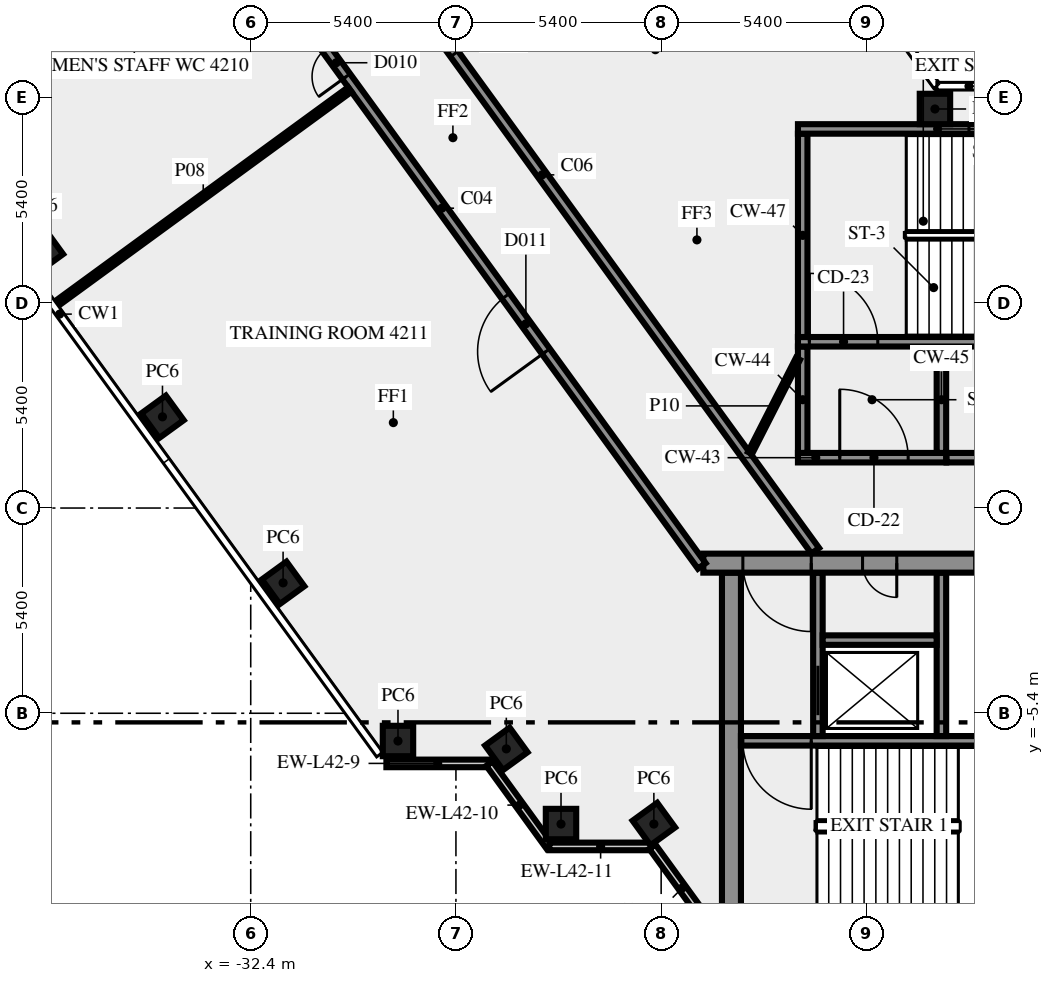
"""IFC4 building model, lengths in metres.
Left out: names, types, materials, properties, quantities, classifications, styles, units other than length and angle.
Written with IfcOpenShell. Run it as: python <this file> out.ifc"""

import sys

from ifc_helpers import new_model, si_unit, direction, frame, frame_2d, origin, origin_2d, place, context, subcontext, project, spatial, rectangle, extrude, element, fill, save


model = new_model("IFC4")
c1 = context("Model", 3, precision=1e-05, world=origin(), true_north=direction((0.0, 1.0)))
c2 = subcontext(c1, "Body", "Model", "MODEL_VIEW")
j1 = project(units=[si_unit("LENGTHUNIT", "METRE"), si_unit("PLANEANGLEUNIT", "RADIAN")], contexts=[c1])
p1 = place(None, origin())
s1 = spatial("IfcSite", under=j1, at=p1, CompositionType="ELEMENT")
p2 = place(p1, origin())
s2 = spatial("IfcBuilding", under=s1, at=p2, CompositionType="ELEMENT")
p3 = place(p2, frame((0.0, 0.0, 180.0)))
s3 = spatial("IfcBuildingStorey", under=s2, at=p3, CompositionType="ELEMENT", Elevation=180.0)
for number, where, z_axis, x_axis in (
    (1, (-37.896, 6.769, 0.0), (0.0, 0.0, 1.0), (0.588, -0.809, 0.0)),
    (2, (-34.722, 2.4, 0.0), (0.0, 0.0, 1.0), (0.588, -0.809, 0.0)),
    (3, (-31.548, -1.969, 0.0), (0.0, 0.0, 1.0), (0.588, -0.809, 0.0)),
    (4, (-28.525, -6.13, 0.0), (0.0, 0.0, 1.0), (1.0, 0.0, 0.0)),
    (5, (-25.674, -6.337, 0.0), (0.0, 0.0, 1.0), (0.588, -0.809, 0.0)),
    (6, (-24.235, -8.315, 0.0), (0.0, 0.0, 1.0), (1.0, 0.0, 0.0)),
    (7, (-21.792, -8.315, 0.0), (0.0, 0.0, 1.0), (0.588, -0.809, 0.0)),
    (8, (-14.395, 10.5, 0.0), (0.0, 0.0, 1.0), (-1.0, 0.0, 0.0)),
):
    element("IfcColumn", number, at=place(p3, frame(where, z_axis=z_axis, x_axis=x_axis)), inside=s3, PredefinedType="COLUMN", context=c2, shape_type="SweptSolid", body=[
        extrude(rectangle(XDim=0.8, YDim=0.8, at=origin_2d()), origin(), (0.0, 0.0, 1.0), 3.65),
    ])
p4 = place(p3, frame((-28.83, -6.719, 0.0), z_axis=(0.0, 0.0, 1.0), x_axis=(1.0, 0.0, 0.0)))
e9 = element("IfcWall", 9, at=p4, inside=s3, PredefinedType="SOLIDWALL", context=c2, shape_type="SweptSolid", body=[
    extrude(rectangle(XDim=2.7, YDim=0.2, at=frame_2d((1.35, 0.0))), origin(), (0.0, 0.0, 1.0), 3.65),
])
p5 = place(p3, frame((-26.12, -6.724, 0.0), z_axis=(0.0, 0.0, 1.0), x_axis=(0.587720002413, -0.809064397168, 0.0)))
e10 = element("IfcWall", 10, at=p5, inside=s3, PredefinedType="SOLIDWALL", context=c2, shape_type="SweptSolid", body=[
    extrude(rectangle(XDim=2.7, YDim=0.2, at=frame_2d((1.35, 0.0))), origin(), (0.0, 0.0, 1.0), 3.65),
])
p6 = place(p3, frame((-24.543, -8.904, 0.0), z_axis=(0.0, 0.0, 1.0), x_axis=(1.0, 0.0, 0.0)))
e11 = element("IfcWall", 11, at=p6, inside=s3, PredefinedType="SOLIDWALL", context=c2, shape_type="SweptSolid", body=[
    extrude(rectangle(XDim=2.7, YDim=0.2, at=frame_2d((1.35, 0.0))), origin(), (0.0, 0.0, 1.0), 3.65),
])
p7 = place(p3, frame((-21.833, -8.909, 0.0), z_axis=(0.0, 0.0, 1.0), x_axis=(0.587766567315, -0.809030569476, 0.0)))
e12 = element("IfcWall", 12, at=p7, inside=s3, PredefinedType="SOLIDWALL", context=c2, shape_type="SweptSolid", body=[
    extrude(rectangle(XDim=2.688, YDim=0.2, at=frame_2d((1.344, 0.0))), origin(), (0.0, 0.0, 1.0), 3.65),
])
p8 = place(p3, frame((-19.75, -10.5, 0.0), z_axis=(0.0, 0.0, 1.0), x_axis=(0.0, 1.0, 0.0)))
e13 = element("IfcWall", 13, at=p8, inside=s3, PredefinedType="SHEAR", context=c2, shape_type="SweptSolid", body=[
    extrude(rectangle(XDim=8.8, YDim=0.5, at=frame_2d((4.4, 0.0))), origin(), (0.0, 0.0, 1.0), 3.65),
])
p9 = place(p3, frame((-11.45, -6.125, 0.0), z_axis=(0.0, 0.0, 1.0), x_axis=(-1.0, 0.0, 0.0)))
e14 = element("IfcWall", 14, at=p9, inside=s3, PredefinedType="SHEAR", context=c2, shape_type="SweptSolid", body=[
    extrude(rectangle(XDim=8.05, YDim=0.25, at=frame_2d((4.025, 0.0))), origin(), (0.0, 0.0, 1.0), 3.65),
])
p10 = place(p9, frame((6.2, 0.0, 0.0)))
e15 = element("IfcOpeningElement", 15, at=p10, cuts=e14, PredefinedType="OPENING", context=c2, shape_type="SweptSolid", body=[
    extrude(rectangle(XDim=1.8, YDim=2.1, at=frame_2d((0.9, 1.05))), frame((0.0, 0.135, 0.0), z_axis=(0.0, -1.0, 0.0), x_axis=(1.0, 0.0, 0.0)), (0.0, 0.0, 1.0), 0.27),
])
p11 = place(p3, frame((-17.475, -6.0, 0.0), z_axis=(0.0, 0.0, 1.0), x_axis=(0.0, 1.0, 0.0)))
e16 = element("IfcWall", 16, at=p11, inside=s3, PredefinedType="SHEAR", context=c2, shape_type="SweptSolid", body=[
    extrude(rectangle(XDim=4.3, YDim=0.25, at=frame_2d((2.15, 0.0))), origin(), (0.0, 0.0, 1.0), 3.65),
])
p12 = place(p11, frame((0.55, 0.0, 0.0)))
e17 = element("IfcOpeningElement", 17, at=p12, cuts=e16, PredefinedType="OPENING", context=c2, shape_type="SweptSolid", body=[
    extrude(rectangle(XDim=1.3, YDim=2.1, at=frame_2d((0.65, 1.05))), frame((0.0, 0.135, 0.0), z_axis=(0.0, -1.0, 0.0), x_axis=(1.0, 0.0, 0.0)), (0.0, 0.0, 1.0), 0.27),
])
p13 = place(p3, frame((-14.225, -6.0, 0.0), z_axis=(0.0, 0.0, 1.0), x_axis=(0.0, 1.0, 0.0)))
e18 = element("IfcWall", 18, at=p13, inside=s3, PredefinedType="SHEAR", context=c2, shape_type="SweptSolid", body=[
    extrude(rectangle(XDim=4.3, YDim=0.25, at=frame_2d((2.15, 0.0))), origin(), (0.0, 0.0, 1.0), 3.65),
])
p14 = place(p3, frame((-17.35, -3.475, 0.0), z_axis=(0.0, 0.0, 1.0), x_axis=(1.0, 0.0, 0.0)))
e19 = element("IfcWall", 19, at=p14, inside=s3, PredefinedType="SHEAR", context=c2, shape_type="SweptSolid", body=[
    extrude(rectangle(XDim=3.0, YDim=0.25, at=frame_2d((1.5, 0.0))), origin(), (0.0, 0.0, 1.0), 3.65),
])
p15 = place(p3, frame((20.49, -1.45, 0.0), z_axis=(0.0, 0.0, 1.0), x_axis=(-1.0, 0.0, 0.0)))
e20 = element("IfcWall", 20, at=p15, inside=s3, PredefinedType="SHEAR", context=c2, shape_type="SweptSolid", body=[
    extrude(rectangle(XDim=40.98, YDim=0.5, at=frame_2d((20.49, 0.0))), origin(), (0.0, 0.0, 1.0), 3.65),
])
p16 = place(p15, frame((38.14, 0.0, 0.0)))
e21 = element("IfcOpeningElement", 21, at=p16, cuts=e20, PredefinedType="OPENING", context=c2, shape_type="SweptSolid", body=[
    extrude(rectangle(XDim=1.8, YDim=2.1, at=frame_2d((0.9, 1.05))), frame((0.0, 0.26, 0.0), z_axis=(0.0, -1.0, 0.0), x_axis=(1.0, 0.0, 0.0)), (0.0, 0.0, 1.0), 0.52),
])
p17 = place(p15, frame((35.89, 0.0, 0.0)))
e22 = element("IfcOpeningElement", 22, at=p17, cuts=e20, PredefinedType="OPENING", context=c2, shape_type="SweptSolid", body=[
    extrude(rectangle(XDim=0.9, YDim=2.1, at=frame_2d((0.45, 1.05))), frame((0.0, 0.26, 0.0), z_axis=(0.0, -1.0, 0.0), x_axis=(1.0, 0.0, 0.0)), (0.0, 0.0, 1.0), 0.52),
])
p18 = place(p15, frame((32.94, 0.0, 0.0)))
e23 = element("IfcOpeningElement", 23, at=p18, cuts=e20, PredefinedType="OPENING", context=c2, shape_type="SweptSolid", body=[
    extrude(rectangle(XDim=0.9, YDim=2.1, at=frame_2d((0.45, 1.05))), frame((0.0, 0.26, 0.0), z_axis=(0.0, -1.0, 0.0), x_axis=(1.0, 0.0, 0.0)), (0.0, 0.0, 1.0), 0.52),
])
p19 = place(p15, frame((30.802, 0.0, 0.0)))
e24 = element("IfcOpeningElement", 24, at=p19, cuts=e20, PredefinedType="OPENING", context=c2, shape_type="SweptSolid", body=[
    extrude(rectangle(XDim=0.9, YDim=2.1, at=frame_2d((0.45, 1.05))), frame((0.0, 0.26, 0.0), z_axis=(0.0, -1.0, 0.0), x_axis=(1.0, 0.0, 0.0)), (0.0, 0.0, 1.0), 0.52),
])
p20 = place(p15, frame((29.24, 0.0, 0.0)))
e25 = element("IfcOpeningElement", 25, at=p20, cuts=e20, PredefinedType="OPENING", context=c2, shape_type="SweptSolid", body=[
    extrude(rectangle(XDim=0.9, YDim=2.1, at=frame_2d((0.45, 1.05))), frame((0.0, 0.26, 0.0), z_axis=(0.0, -1.0, 0.0), x_axis=(1.0, 0.0, 0.0)), (0.0, 0.0, 1.0), 0.52),
])
p21 = place(p15, frame((27.39, 0.0, 0.0)))
e26 = element("IfcOpeningElement", 26, at=p21, cuts=e20, PredefinedType="OPENING", context=c2, shape_type="SweptSolid", body=[
    extrude(rectangle(XDim=0.9, YDim=2.1, at=frame_2d((0.45, 1.05))), frame((0.0, 0.26, 0.0), z_axis=(0.0, -1.0, 0.0), x_axis=(1.0, 0.0, 0.0)), (0.0, 0.0, 1.0), 0.52),
])
p22 = place(p15, frame((25.228, 0.0, 0.0)))
e27 = element("IfcOpeningElement", 27, at=p22, cuts=e20, PredefinedType="OPENING", context=c2, shape_type="SweptSolid", body=[
    extrude(rectangle(XDim=0.9, YDim=2.1, at=frame_2d((0.45, 1.05))), frame((0.0, 0.26, 0.0), z_axis=(0.0, -1.0, 0.0), x_axis=(1.0, 0.0, 0.0)), (0.0, 0.0, 1.0), 0.52),
])
p23 = place(p15, frame((19.59, 0.0, 0.0)))
e28 = element("IfcOpeningElement", 28, at=p23, cuts=e20, PredefinedType="OPENING", context=c2, shape_type="SweptSolid", body=[
    extrude(rectangle(XDim=2.0, YDim=2.1, at=frame_2d((1.0, 1.05))), frame((0.0, 0.26, 0.0), z_axis=(0.0, -1.0, 0.0), x_axis=(1.0, 0.0, 0.0)), (0.0, 0.0, 1.0), 0.52),
])
p24 = place(p15, frame((7.14, 0.0, 0.0)))
e29 = element("IfcOpeningElement", 29, at=p24, cuts=e20, PredefinedType="OPENING", context=c2, shape_type="SweptSolid", body=[
    extrude(rectangle(XDim=0.9, YDim=2.1, at=frame_2d((0.45, 1.05))), frame((0.0, 0.26, 0.0), z_axis=(0.0, -1.0, 0.0), x_axis=(1.0, 0.0, 0.0)), (0.0, 0.0, 1.0), 0.52),
])
p25 = place(p15, frame((5.028, 0.0, 0.0)))
e30 = element("IfcOpeningElement", 30, at=p25, cuts=e20, PredefinedType="OPENING", context=c2, shape_type="SweptSolid", body=[
    extrude(rectangle(XDim=0.8, YDim=2.1, at=frame_2d((0.4, 1.05))), frame((0.0, 0.26, 0.0), z_axis=(0.0, -1.0, 0.0), x_axis=(1.0, 0.0, 0.0)), (0.0, 0.0, 1.0), 0.52),
])
p26 = place(p15, frame((3.452, 0.0, 0.0)))
e31 = element("IfcOpeningElement", 31, at=p26, cuts=e20, PredefinedType="OPENING", context=c2, shape_type="SweptSolid", body=[
    extrude(rectangle(XDim=0.8, YDim=2.1, at=frame_2d((0.4, 1.05))), frame((0.0, 0.26, 0.0), z_axis=(0.0, -1.0, 0.0), x_axis=(1.0, 0.0, 0.0)), (0.0, 0.0, 1.0), 0.52),
])
p27 = place(p15, frame((1.04, 0.0, 0.0)))
e32 = element("IfcOpeningElement", 32, at=p27, cuts=e20, PredefinedType="OPENING", context=c2, shape_type="SweptSolid", body=[
    extrude(rectangle(XDim=1.8, YDim=2.1, at=frame_2d((0.9, 1.05))), frame((0.0, 0.26, 0.0), z_axis=(0.0, -1.0, 0.0), x_axis=(1.0, 0.0, 0.0)), (0.0, 0.0, 1.0), 0.52),
])
p28 = place(p3, frame((-18.0, 1.325, 0.0), z_axis=(0.0, 0.0, 1.0), x_axis=(1.0, 0.0, 0.0)))
e33 = element("IfcWall", 33, at=p28, inside=s3, PredefinedType="SHEAR", context=c2, shape_type="SweptSolid", body=[
    extrude(rectangle(XDim=3.9, YDim=0.25, at=frame_2d((1.95, 0.0))), origin(), (0.0, 0.0, 1.0), 3.65),
])
p29 = place(p28, frame((1.1, 0.0, 0.0)))
e34 = element("IfcOpeningElement", 34, at=p29, cuts=e33, PredefinedType="OPENING", context=c2, shape_type="SweptSolid", body=[
    extrude(rectangle(XDim=1.8, YDim=2.1, at=frame_2d((0.9, 1.05))), frame((0.0, 0.135, 0.0), z_axis=(0.0, -1.0, 0.0), x_axis=(1.0, 0.0, 0.0)), (0.0, 0.0, 1.0), 0.27),
])
for number, where, z_axis, x_axis in (
    (35, (-17.875, 1.45, 0.0), (0.0, 0.0, 1.0), (0.0, 1.0, 0.0)),
    (36, (-14.225, 1.45, 0.0), (0.0, 0.0, 1.0), (0.0, 1.0, 0.0)),
):
    element("IfcWall", number, at=place(p3, frame(where, z_axis=z_axis, x_axis=x_axis)), inside=s3, PredefinedType="SHEAR", context=c2, shape_type="SweptSolid", body=[
        extrude(rectangle(XDim=2.8, YDim=0.25, at=frame_2d((1.4, 0.0))), origin(), (0.0, 0.0, 1.0), 3.65),
    ])
p30 = place(p3, frame((-18.0, 4.375, 0.0), z_axis=(0.0, 0.0, 1.0), x_axis=(1.0, 0.0, 0.0)))
e37 = element("IfcWall", 37, at=p30, inside=s3, PredefinedType="SHEAR", context=c2, shape_type="SweptSolid", body=[
    extrude(rectangle(XDim=10.5, YDim=0.25, at=frame_2d((5.25, 0.0))), origin(), (0.0, 0.0, 1.0), 3.65),
])
p31 = place(p30, frame((0.3, 0.0, 0.0)))
e38 = element("IfcOpeningElement", 38, at=p31, cuts=e37, PredefinedType="OPENING", context=c2, shape_type="SweptSolid", body=[
    extrude(rectangle(XDim=1.8, YDim=2.1, at=frame_2d((0.9, 1.05))), frame((0.0, 0.135, 0.0), z_axis=(0.0, -1.0, 0.0), x_axis=(1.0, 0.0, 0.0)), (0.0, 0.0, 1.0), 0.27),
])
p32 = place(p3, frame((-17.875, 4.5, 0.0), z_axis=(0.0, 0.0, 1.0), x_axis=(0.0, 1.0, 0.0)))
e39 = element("IfcWall", 39, at=p32, inside=s3, PredefinedType="SHEAR", context=c2, shape_type="SweptSolid", body=[
    extrude(rectangle(XDim=5.35, YDim=0.25, at=frame_2d((2.675, 0.0))), origin(), (0.0, 0.0, 1.0), 3.65),
])
p33 = place(p3, frame((-18.0, 9.975, 0.0), z_axis=(0.0, 0.0, 1.0), x_axis=(1.0, 0.0, 0.0)))
e40 = element("IfcWall", 40, at=p33, inside=s3, PredefinedType="SHEAR", context=c2, shape_type="SweptSolid", body=[
    extrude(rectangle(XDim=10.5, YDim=0.25, at=frame_2d((5.25, 0.0))), origin(), (0.0, 0.0, 1.0), 3.65),
])
p34 = place(p33, frame((4.5, 0.0, 1.0)))
e41 = element("IfcOpeningElement", 41, at=p34, cuts=e40, PredefinedType="OPENING", context=c2, shape_type="SweptSolid", body=[
    extrude(rectangle(XDim=1.2, YDim=1.2, at=frame_2d((0.6, 0.6))), frame((0.0, 0.135, 0.0), z_axis=(0.0, -1.0, 0.0), x_axis=(1.0, 0.0, 0.0)), (0.0, 0.0, 1.0), 0.27),
])
p35 = place(p3, frame((-20.531, -1.523, 0.0), z_axis=(0.0, 0.0, 1.0), x_axis=(-0.587784239999, 0.809017729849, 0.0)))
e42 = element("IfcWall", 42, at=p35, inside=s3, PredefinedType="SOLIDWALL", context=c2, shape_type="SweptSolid", body=[
    extrude(rectangle(XDim=23.271, YDim=0.25, at=frame_2d((11.635, 0.0))), origin(), (0.0, 0.0, 1.0), 3.65),
])
p36 = place(p35, frame((15.916, 0.0, 0.0)))
e43 = element("IfcOpeningElement", 43, at=p36, cuts=e42, PredefinedType="OPENING", context=c2, shape_type="SweptSolid", body=[
    extrude(rectangle(XDim=0.9, YDim=2.1, at=frame_2d((0.45, 1.05))), frame((0.0, 0.135, 0.0), z_axis=(0.0, -1.0, 0.0), x_axis=(1.0, 0.0, 0.0)), (0.0, 0.0, 1.0), 0.27),
])
p37 = place(p35, frame((6.974, 0.0, 0.0)))
e44 = element("IfcOpeningElement", 44, at=p37, cuts=e42, PredefinedType="OPENING", context=c2, shape_type="SweptSolid", body=[
    extrude(rectangle(XDim=1.8, YDim=2.1, at=frame_2d((0.9, 1.05))), frame((0.0, 0.135, 0.0), z_axis=(0.0, -1.0, 0.0), x_axis=(1.0, 0.0, 0.0)), (0.0, 0.0, 1.0), 0.27),
])
p38 = place(p3, frame((-31.918, 18.658, 0.0), z_axis=(0.0, 0.0, 1.0), x_axis=(0.587788731405, -0.80901446664, 0.0)))
e45 = element("IfcWall", 45, at=p38, inside=s3, PredefinedType="SOLIDWALL", context=c2, shape_type="SweptSolid", body=[
    extrude(rectangle(XDim=24.453, YDim=0.25, at=frame_2d((12.227, 0.0))), origin(), (0.0, 0.0, 1.0), 3.65),
])
p39 = place(p38, frame((0.224, 0.0, 0.0)))
e46 = element("IfcOpeningElement", 46, at=p39, cuts=e45, PredefinedType="OPENING", context=c2, shape_type="SweptSolid", body=[
    extrude(rectangle(XDim=0.9, YDim=2.1, at=frame_2d((0.45, 1.05))), frame((0.0, 0.135, 0.0), z_axis=(0.0, -1.0, 0.0), x_axis=(1.0, 0.0, 0.0)), (0.0, 0.0, 1.0), 0.27),
])
p40 = place(p38, frame((7.395, 0.0, 0.0)))
e47 = element("IfcOpeningElement", 47, at=p40, cuts=e45, PredefinedType="OPENING", context=c2, shape_type="SweptSolid", body=[
    extrude(rectangle(XDim=0.9, YDim=2.1, at=frame_2d((0.45, 1.05))), frame((0.0, 0.135, 0.0), z_axis=(0.0, -1.0, 0.0), x_axis=(1.0, 0.0, 0.0)), (0.0, 0.0, 1.0), 0.27),
])
p41 = place(p3, frame((-14.09, 1.325, 0.0), z_axis=(0.0, 0.0, 1.0), x_axis=(1.0, 0.0, 0.0)))
e48 = element("IfcWall", 48, at=p41, inside=s3, PredefinedType="SOLIDWALL", context=c2, shape_type="SweptSolid", body=[
    extrude(rectangle(XDim=9.431, YDim=0.25, at=frame_2d((4.716, 0.0))), origin(), (0.0, 0.0, 1.0), 3.65),
])
p42 = place(p3, frame((-42.036, 11.615, 0.0), z_axis=(0.0, 0.0, 1.0), x_axis=(0.808985331811, 0.587828829605, 0.0)))
e49 = element("IfcWall", 49, at=p42, inside=s3, PredefinedType="PARTITIONING", context=c2, shape_type="SweptSolid", body=[
    extrude(rectangle(XDim=9.57, YDim=0.12, at=frame_2d((4.785, 0.0))), origin(), (0.0, 0.0, 1.0), 2.85),
])
p43 = place(p3, frame((-37.506, 5.381, 0.0), z_axis=(0.0, 0.0, 1.0), x_axis=(0.807645841498, 0.589667868135, 0.0)))
e50 = element("IfcWall", 50, at=p43, inside=s3, PredefinedType="PARTITIONING", context=c2, shape_type="SweptSolid", body=[
    extrude(rectangle(XDim=9.551, YDim=0.15, at=frame_2d((4.775, 0.0))), origin(), (0.0, 0.0, 1.0), 2.85),
])
p44 = place(p3, frame((-19.261, 1.45, 0.0), z_axis=(0.0, 0.0, 1.0), x_axis=(0.453950796792, 0.891026752736, 0.0)))
e51 = element("IfcWall", 51, at=p44, inside=s3, PredefinedType="PARTITIONING", context=c2, shape_type="SweptSolid", body=[
    extrude(rectangle(XDim=2.778, YDim=0.12, at=frame_2d((1.389, 0.0))), origin(), (0.0, 0.0, 1.0), 3.65),
])
p45 = place(p10, origin())
e52 = element("IfcDoor", 52, at=p45, inside=s3, OperationType="DOUBLE_DOOR_SINGLE_SWING", PredefinedType="DOOR", context=c2, shape_type="SweptSolid", body=[
    extrude(rectangle(XDim=1.8, YDim=2.1, at=frame_2d((0.9, 1.05))), frame((0.0, 0.025, 0.0), z_axis=(0.0, -1.0, 0.0), x_axis=(1.0, 0.0, 0.0)), (0.0, 0.0, 1.0), 0.05),
])
fill(e15, e52)
p46 = place(p12, origin())
e53 = element("IfcDoor", 53, at=p46, inside=s3, OperationType="DOUBLE_DOOR_SLIDING", PredefinedType="DOOR", context=c2, shape_type="SweptSolid", body=[
    extrude(rectangle(XDim=1.3, YDim=2.1, at=frame_2d((0.65, 1.05))), frame((0.0, 0.025, 0.0), z_axis=(0.0, -1.0, 0.0), x_axis=(1.0, 0.0, 0.0)), (0.0, 0.0, 1.0), 0.05),
])
fill(e17, e53)
p47 = place(p16, origin())
e54 = element("IfcDoor", 54, at=p47, inside=s3, OperationType="DOUBLE_DOOR_SINGLE_SWING", PredefinedType="DOOR", context=c2, shape_type="SweptSolid", body=[
    extrude(rectangle(XDim=1.8, YDim=2.1, at=frame_2d((0.9, 1.05))), frame((0.0, 0.025, 0.0), z_axis=(0.0, -1.0, 0.0), x_axis=(1.0, 0.0, 0.0)), (0.0, 0.0, 1.0), 0.05),
])
fill(e21, e54)
p48 = place(p17, origin())
e55 = element("IfcDoor", 55, at=p48, inside=s3, OperationType="SINGLE_SWING_RIGHT", PredefinedType="DOOR", context=c2, shape_type="SweptSolid", body=[
    extrude(rectangle(XDim=0.9, YDim=2.1, at=frame_2d((0.45, 1.05))), frame((0.0, 0.025, 0.0), z_axis=(0.0, -1.0, 0.0), x_axis=(1.0, 0.0, 0.0)), (0.0, 0.0, 1.0), 0.05),
])
fill(e22, e55)
p49 = place(p29, origin())
e56 = element("IfcDoor", 56, at=p49, inside=s3, OperationType="DOUBLE_DOOR_SINGLE_SWING", PredefinedType="DOOR", context=c2, shape_type="SweptSolid", body=[
    extrude(rectangle(XDim=1.8, YDim=2.1, at=frame_2d((0.9, 1.05))), frame((0.0, 0.025, 0.0), z_axis=(0.0, -1.0, 0.0), x_axis=(1.0, 0.0, 0.0)), (0.0, 0.0, 1.0), 0.05),
])
fill(e34, e56)
p50 = place(p31, origin())
e57 = element("IfcDoor", 57, at=p50, inside=s3, OperationType="DOUBLE_DOOR_SINGLE_SWING", PredefinedType="DOOR", context=c2, shape_type="SweptSolid", body=[
    extrude(rectangle(XDim=1.8, YDim=2.1, at=frame_2d((0.9, 1.05))), frame((0.0, 0.025, 0.0), z_axis=(0.0, -1.0, 0.0), x_axis=(1.0, 0.0, 0.0)), (0.0, 0.0, 1.0), 0.05),
])
fill(e38, e57)
p51 = place(p34, origin())
e58 = element("IfcWindow", 58, at=p51, inside=s3, PartitioningType="SINGLE_PANEL", PredefinedType="WINDOW", context=c2, shape_type="SweptSolid", body=[
    extrude(rectangle(XDim=1.2, YDim=1.2, at=frame_2d((0.6, 0.6))), frame((0.0, 0.03, 0.0), z_axis=(0.0, -1.0, 0.0), x_axis=(1.0, 0.0, 0.0)), (0.0, 0.0, 1.0), 0.06),
])
fill(e41, e58)
p52 = place(p40, origin())
e59 = element("IfcDoor", 59, at=p52, inside=s3, OperationType="SINGLE_SWING_LEFT", PredefinedType="DOOR", context=c2, shape_type="SweptSolid", body=[
    extrude(rectangle(XDim=0.9, YDim=2.1, at=frame_2d((0.45, 1.05))), frame((0.0, 0.025, 0.0), z_axis=(0.0, -1.0, 0.0), x_axis=(1.0, 0.0, 0.0)), (0.0, 0.0, 1.0), 0.05),
])
fill(e47, e59)
p53 = place(p36, origin())
e60 = element("IfcDoor", 60, at=p53, inside=s3, OperationType="SINGLE_SWING_LEFT", PredefinedType="DOOR", context=c2, shape_type="SweptSolid", body=[
    extrude(rectangle(XDim=0.9, YDim=2.1, at=frame_2d((0.45, 1.05))), frame((0.0, 0.025, 0.0), z_axis=(0.0, -1.0, 0.0), x_axis=(1.0, 0.0, 0.0)), (0.0, 0.0, 1.0), 0.05),
])
fill(e43, e60)
p54 = place(p37, origin())
e61 = element("IfcDoor", 61, at=p54, inside=s3, OperationType="DOUBLE_DOOR_SINGLE_SWING", PredefinedType="DOOR", context=c2, shape_type="SweptSolid", body=[
    extrude(rectangle(XDim=1.8, YDim=2.1, at=frame_2d((0.9, 1.05))), frame((0.0, 0.025, 0.0), z_axis=(0.0, -1.0, 0.0), x_axis=(1.0, 0.0, 0.0)), (0.0, 0.0, 1.0), 0.05),
])
fill(e44, e61)
save(model, sys.argv[1])
